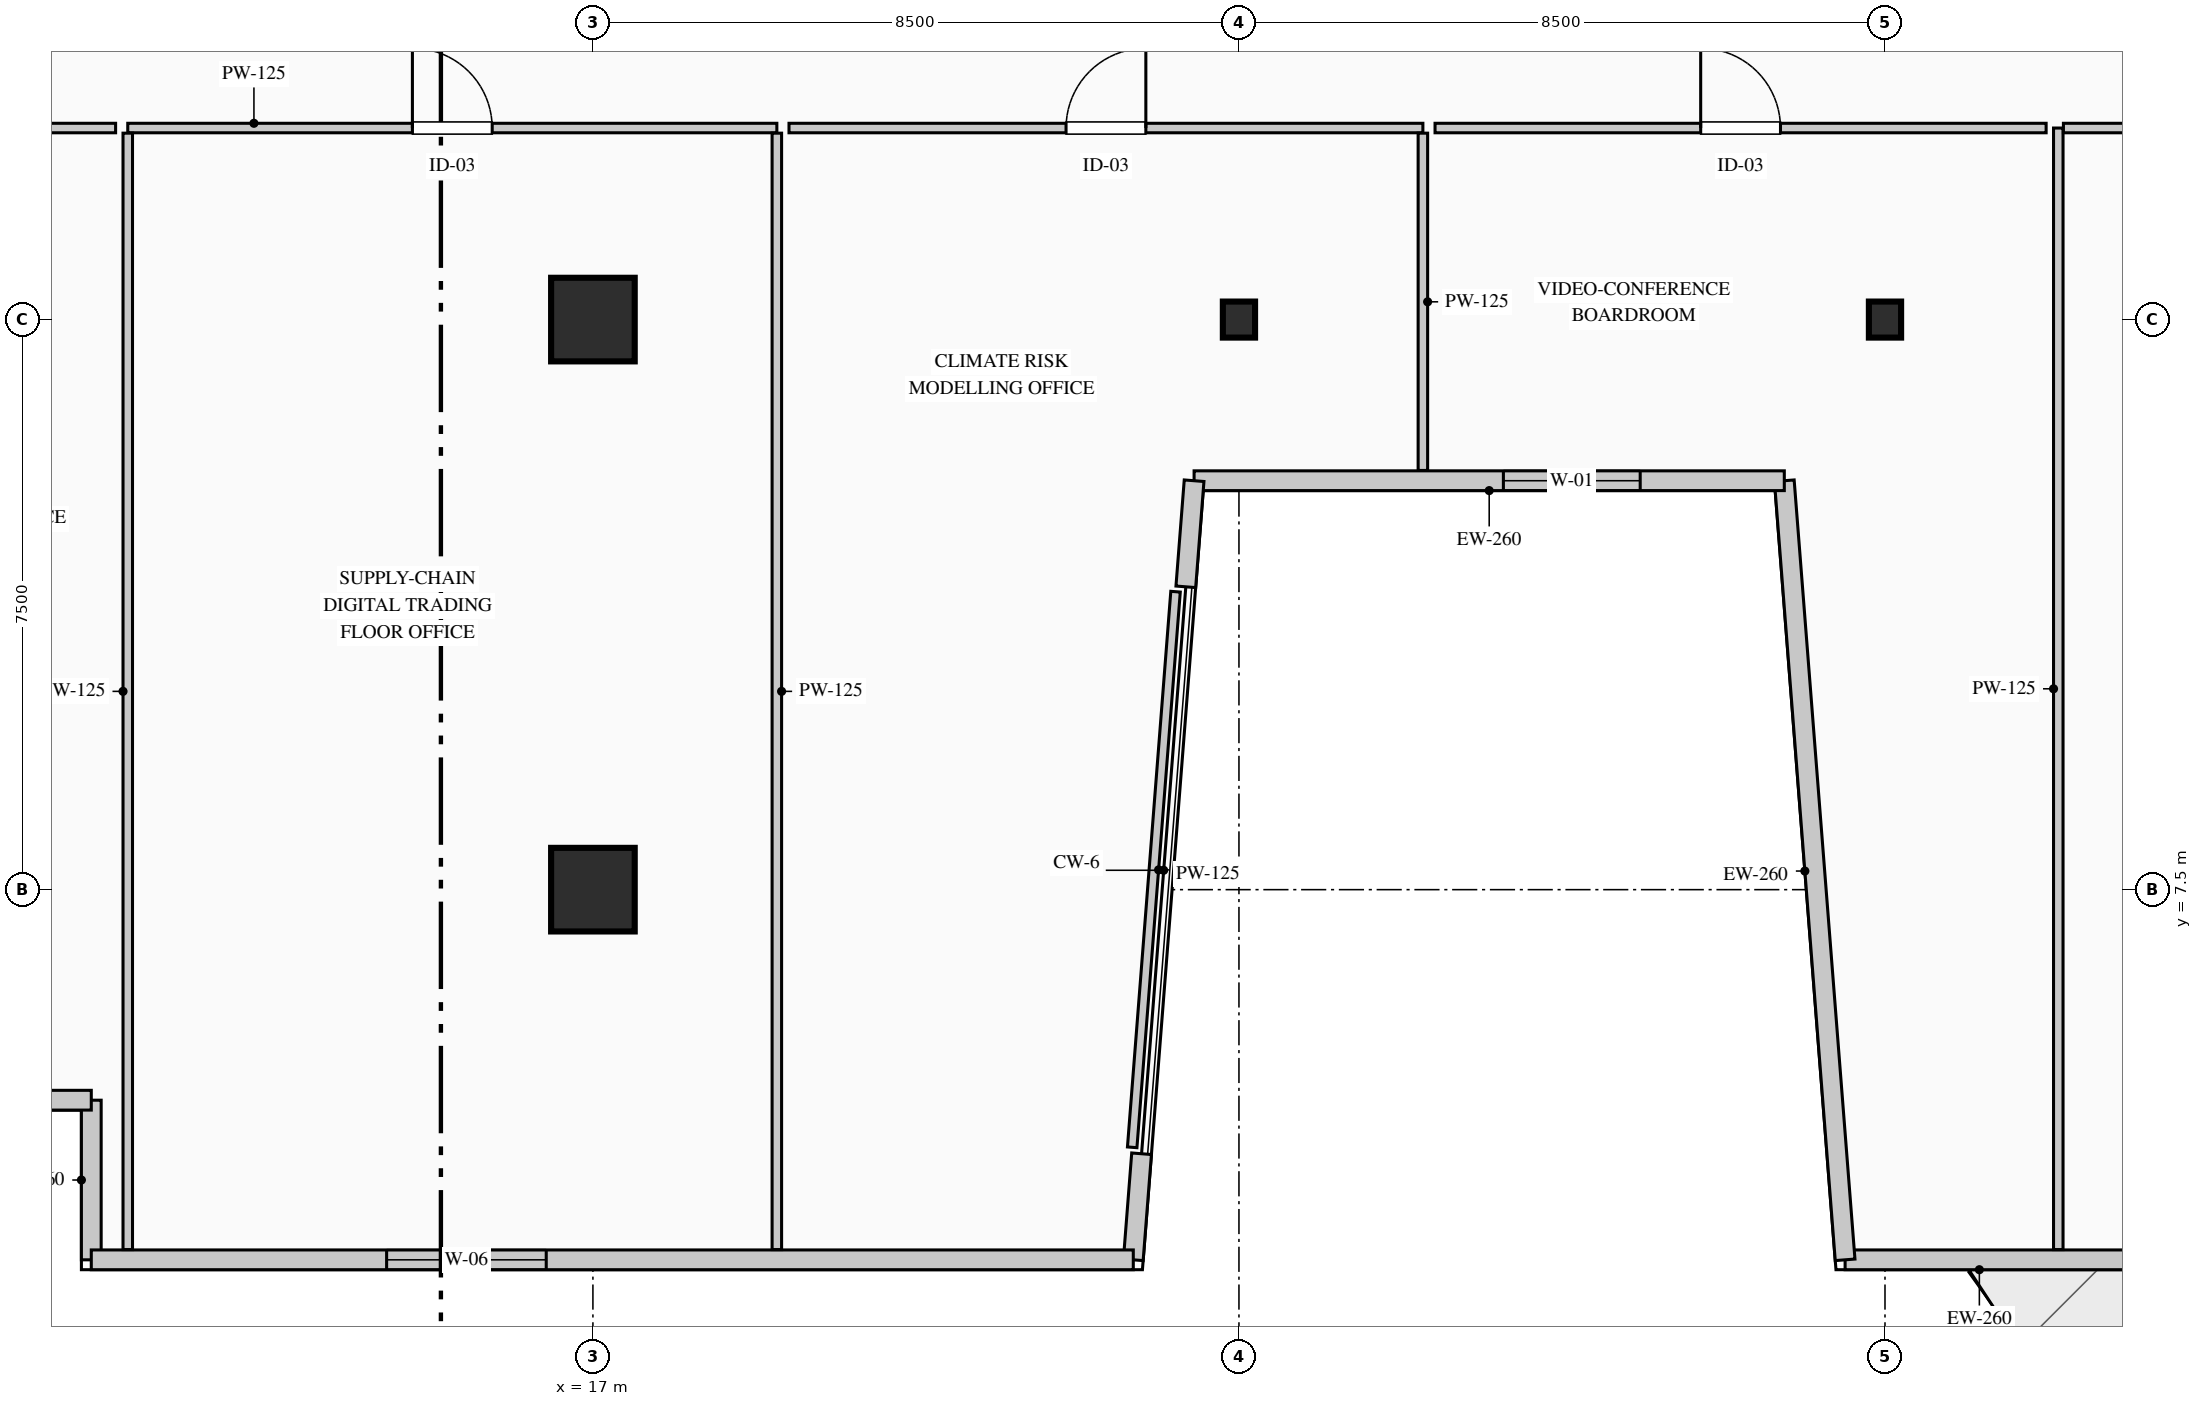
"""IFC4 building model, lengths in metres.
Left out: names, types, materials, properties, quantities, classifications, styles, units other than length and angle.
Written with IfcOpenShell. Run it as: python <this file> out.ifc"""

import sys

from ifc_helpers import new_model, si_unit, direction, frame, frame_2d, origin, origin_2d, place, context, subcontext, project, spatial, rectangle, i_section, extrude, element, fill, save


model = new_model("IFC4")
c1 = context("Model", 3, precision=1e-05, world=origin(), true_north=direction((0.0, 1.0)))
c2 = subcontext(c1, "Body", "Model", "MODEL_VIEW")
j1 = project(units=[si_unit("LENGTHUNIT", "METRE"), si_unit("PLANEANGLEUNIT", "RADIAN")], contexts=[c1])
p1 = place(None, origin())
s1 = spatial("IfcSite", under=j1, at=p1, CompositionType="ELEMENT")
p2 = place(p1, origin())
s2 = spatial("IfcBuilding", under=s1, at=p2, CompositionType="ELEMENT")
p3 = place(p2, frame((0.0, 0.0, 150.9)))
s3 = spatial("IfcBuildingStorey", under=s2, at=p3, CompositionType="ELEMENT", Elevation=150.9)
for number, where, z_axis, x_axis in (
    (1, (17.0, 7.5, 0.0), (0.0, 0.0, 1.0), (1.0, 0.0, 0.0)),
    (2, (17.0, 15.0, 0.0), (0.0, 0.0, 1.0), (1.0, 0.0, 0.0)),
):
    element("IfcColumn", number, at=place(p3, frame(where, z_axis=z_axis, x_axis=x_axis)), inside=s3, PredefinedType="COLUMN", context=c2, shape_type="SweptSolid", body=[
        extrude(rectangle(XDim=1.1, YDim=1.1, at=origin_2d()), origin(), (0.0, 0.0, 1.0), 3.95),
    ])
for number, where, z_axis, x_axis in (
    (3, (25.5, 15.0, 0.0), (0.0, 0.0, 1.0), (1.0, 0.0, 0.0)),
    (4, (34.0, 15.0, 0.0), (0.0, 0.0, 1.0), (1.0, 0.0, 0.0)),
):
    element("IfcColumn", number, at=place(p3, frame(where, z_axis=z_axis, x_axis=x_axis)), inside=s3, PredefinedType="COLUMN", context=c2, shape_type="SweptSolid", body=[
        extrude(i_section(OverallWidth=0.424, OverallDepth=0.474, WebThickness=0.048, FlangeThickness=0.077, FilletRadius=0.015, at=origin_2d()), origin(), (0.0, 0.0, 1.0), 3.95),
    ])
p4 = place(p3, frame((10.4, 2.63, 0.0), z_axis=(0.0, 0.0, 1.0), x_axis=(0.0, 1.0, 0.0)))
e5 = element("IfcWall", 5, at=p4, inside=s3, PredefinedType="STANDARD", context=c2, shape_type="SweptSolid", body=[
    extrude(rectangle(XDim=2.1, YDim=0.26, at=frame_2d((1.05, 0.0))), origin(), (0.0, 0.0, 1.0), 3.69),
])
p5 = place(p3, frame((10.4, 4.73, 0.0), z_axis=(0.0, 0.0, 1.0), x_axis=(-1.0, 0.0, 0.0)))
e6 = element("IfcWall", 6, at=p5, inside=s3, PredefinedType="STANDARD", context=c2, shape_type="SweptSolid", body=[
    extrude(rectangle(XDim=2.407, YDim=0.26, at=frame_2d((1.204, 0.0))), origin(), (0.0, 0.0, 1.0), 3.69),
])
p6 = place(p3, frame((42.44, 2.63, 0.0), z_axis=(0.0, 0.0, 1.0), x_axis=(-1.0, 0.0, 0.0)))
e7 = element("IfcWall", 7, at=p6, inside=s3, PredefinedType="STANDARD", context=c2, shape_type="SweptSolid", body=[
    extrude(rectangle(XDim=8.965, YDim=0.26, at=frame_2d((4.482, 0.0))), origin(), (0.0, 0.0, 1.0), 3.69),
])
p7 = place(p6, frame((3.882, 0.0, 0.0)))
e8 = element("IfcOpeningElement", 8, at=p7, cuts=e7, PredefinedType="OPENING", context=c2, shape_type="SweptSolid", body=[
    extrude(rectangle(XDim=1.2, YDim=2.2, at=frame_2d((0.6, 1.1))), frame((0.0, 0.14, 0.0), z_axis=(0.0, -1.0, 0.0), x_axis=(1.0, 0.0, 0.0)), (0.0, 0.0, 1.0), 0.28),
])
p8 = place(p3, frame((33.475, 2.63, 0.0), z_axis=(0.0, 0.0, 1.0), x_axis=(-0.077793257511, 0.996969512616, 0.0)))
e9 = element("IfcWall", 9, at=p8, inside=s3, PredefinedType="STANDARD", context=c2, shape_type="SweptSolid", body=[
    extrude(rectangle(XDim=10.281, YDim=0.26, at=frame_2d((5.141, 0.0))), origin(), (0.0, 0.0, 1.0), 3.69),
])
p9 = place(p3, frame((32.675, 12.88, 0.0), z_axis=(0.0, 0.0, 1.0), x_axis=(-1.0, 0.0, 0.0)))
e10 = element("IfcWall", 10, at=p9, inside=s3, PredefinedType="STANDARD", context=c2, shape_type="SweptSolid", body=[
    extrude(rectangle(XDim=7.765, YDim=0.26, at=frame_2d((3.883, 0.0))), origin(), (0.0, 0.0, 1.0), 3.69),
])
p10 = place(p9, frame((1.896, 0.0, 0.9)))
e11 = element("IfcOpeningElement", 11, at=p10, cuts=e10, PredefinedType="OPENING", context=c2, shape_type="SweptSolid", body=[
    extrude(rectangle(XDim=1.8, YDim=2.1, at=frame_2d((0.9, 1.05))), frame((0.0, 0.14, 0.0), z_axis=(0.0, -1.0, 0.0), x_axis=(1.0, 0.0, 0.0)), (0.0, 0.0, 1.0), 0.28),
])
for number, where, z_axis, x_axis in (
    (12, (24.91, 12.88, 0.0), (0.0, 0.0, 1.0), (-0.078, -0.997, 0.0)),
    (13, (24.219, 4.026, 0.0), (0.0, 0.0, 1.0), (-0.078, -0.997, 0.0)),
):
    element("IfcWall", number, at=place(p3, frame(where, z_axis=z_axis, x_axis=x_axis)), inside=s3, PredefinedType="STANDARD", context=c2, shape_type="SweptSolid", body=[
        extrude(rectangle(XDim=1.4, YDim=0.26, at=frame_2d((0.7, 0.0))), origin(), (0.0, 0.0, 1.0), 3.69),
    ])
p11 = place(p3, frame((24.11, 2.63, 0.0), z_axis=(0.0, 0.0, 1.0), x_axis=(-1.0, 0.0, 0.0)))
e14 = element("IfcWall", 14, at=p11, inside=s3, PredefinedType="STANDARD", context=c2, shape_type="SweptSolid", body=[
    extrude(rectangle(XDim=13.71, YDim=0.26, at=frame_2d((6.855, 0.0))), origin(), (0.0, 0.0, 1.0), 3.69),
])
p12 = place(p11, frame((7.724, 0.0, 0.9)))
e15 = element("IfcOpeningElement", 15, at=p12, cuts=e14, PredefinedType="OPENING", context=c2, shape_type="SweptSolid", body=[
    extrude(rectangle(XDim=2.1, YDim=2.0, at=frame_2d((1.05, 1.0))), frame((0.0, 0.14, 0.0), z_axis=(0.0, -1.0, 0.0), x_axis=(1.0, 0.0, 0.0)), (0.0, 0.0, 1.0), 0.28),
])
p13 = place(p3, frame((10.88, 17.52, 0.0), z_axis=(0.0, 0.0, 1.0), x_axis=(1.0, 0.0, 0.0)))
e16 = element("IfcWall", 16, at=p13, inside=s3, PredefinedType="PARTITIONING", context=c2, shape_type="SweptSolid", body=[
    extrude(rectangle(XDim=8.54, YDim=0.125, at=frame_2d((4.27, 0.0))), origin(), (0.0, 0.0, 1.0), 3.69),
])
p14 = place(p13, frame((3.745, 0.0, 0.0)))
e17 = element("IfcOpeningElement", 17, at=p14, cuts=e16, PredefinedType="OPENING", context=c2, shape_type="SweptSolid", body=[
    extrude(rectangle(XDim=1.05, YDim=2.15, at=frame_2d((0.525, 1.075))), frame((0.0, 0.073, 0.0), z_axis=(0.0, -1.0, 0.0), x_axis=(1.0, 0.0, 0.0)), (0.0, 0.0, 1.0), 0.145),
])
for number, where, z_axis, x_axis in (
    (18, (19.42, 17.452, 0.0), (0.0, 0.0, 1.0), (0.0, -1.0, 0.0)),
    (19, (10.88, 2.765, 0.0), (0.0, 0.0, 1.0), (0.0, 1.0, 0.0)),
):
    element("IfcWall", number, at=place(p3, frame(where, z_axis=z_axis, x_axis=x_axis)), inside=s3, PredefinedType="PARTITIONING", context=c2, shape_type="SweptSolid", body=[
        extrude(rectangle(XDim=14.688, YDim=0.125, at=frame_2d((7.344, 0.0))), origin(), (0.0, 0.0, 1.0), 3.69),
    ])
p15 = place(p3, frame((24.666, 11.42, 0.0), z_axis=(0.0, 0.0, 1.0), x_axis=(-0.077816821526, -0.996967673642, 0.0)))
e20 = element("IfcWall", 20, at=p15, inside=s3, PredefinedType="PARTITIONING", context=c2, shape_type="SweptSolid", body=[
    extrude(rectangle(XDim=7.332, YDim=0.125, at=frame_2d((3.666, 0.0))), origin(), (0.0, 0.0, 1.0), 3.69),
])
p16 = place(p3, frame((19.58, 17.52, 0.0), z_axis=(0.0, 0.0, 1.0), x_axis=(1.0, 0.0, 0.0)))
e21 = element("IfcWall", 21, at=p16, inside=s3, PredefinedType="PARTITIONING", context=c2, shape_type="SweptSolid", body=[
    extrude(rectangle(XDim=8.34, YDim=0.125, at=frame_2d((4.17, 0.0))), origin(), (0.0, 0.0, 1.0), 3.475),
])
p17 = place(p16, frame((3.645, 0.0, 0.0)))
e22 = element("IfcOpeningElement", 22, at=p17, cuts=e21, PredefinedType="OPENING", context=c2, shape_type="SweptSolid", body=[
    extrude(rectangle(XDim=1.05, YDim=2.15, at=frame_2d((0.525, 1.075))), frame((0.0, 0.073, 0.0), z_axis=(0.0, -1.0, 0.0), x_axis=(1.0, 0.0, 0.0)), (0.0, 0.0, 1.0), 0.145),
])
p18 = place(p3, frame((27.92, 17.452, 0.0), z_axis=(0.0, 0.0, 1.0), x_axis=(0.0, -1.0, 0.0)))
e23 = element("IfcWall", 23, at=p18, inside=s3, PredefinedType="PARTITIONING", context=c2, shape_type="SweptSolid", body=[
    extrude(rectangle(XDim=4.438, YDim=0.125, at=frame_2d((2.219, 0.0))), origin(), (0.0, 0.0, 1.0), 3.69),
])
p19 = place(p3, frame((36.28, 2.765, 0.0), z_axis=(0.0, 0.0, 1.0), x_axis=(0.0, 1.0, 0.0)))
e24 = element("IfcWall", 24, at=p19, inside=s3, PredefinedType="PARTITIONING", context=c2, shape_type="SweptSolid", body=[
    extrude(rectangle(XDim=14.755, YDim=0.125, at=frame_2d((7.377, 0.0))), origin(), (0.0, 0.0, 1.0), 3.69),
])
p20 = place(p3, frame((36.347, 17.52, 0.0), z_axis=(0.0, 0.0, 1.0), x_axis=(1.0, 0.0, 0.0)))
e25 = element("IfcWall", 25, at=p20, inside=s3, PredefinedType="PARTITIONING", context=c2, shape_type="SweptSolid", body=[
    extrude(rectangle(XDim=8.603, YDim=0.125, at=frame_2d((4.301, 0.0))), origin(), (0.0, 0.0, 1.0), 3.69),
])
p21 = place(p20, frame((3.776, 0.0, 0.0)))
e26 = element("IfcOpeningElement", 26, at=p21, cuts=e25, PredefinedType="OPENING", context=c2, shape_type="SweptSolid", body=[
    extrude(rectangle(XDim=1.05, YDim=2.15, at=frame_2d((0.525, 1.075))), frame((0.0, 0.073, 0.0), z_axis=(0.0, -1.0, 0.0), x_axis=(1.0, 0.0, 0.0)), (0.0, 0.0, 1.0), 0.145),
])
p22 = place(p3, frame((6.36, 17.52, 0.0), z_axis=(0.0, 0.0, 1.0), x_axis=(1.0, 0.0, 0.0)))
e27 = element("IfcWall", 27, at=p22, inside=s3, PredefinedType="PARTITIONING", context=c2, shape_type="SweptSolid", body=[
    extrude(rectangle(XDim=4.36, YDim=0.125, at=frame_2d((2.18, 0.0))), origin(), (0.0, 0.0, 1.0), 3.69),
])
p23 = place(p22, frame((1.655, 0.0, 0.0)))
e28 = element("IfcOpeningElement", 28, at=p23, cuts=e27, PredefinedType="OPENING", context=c2, shape_type="SweptSolid", body=[
    extrude(rectangle(XDim=1.05, YDim=2.15, at=frame_2d((0.525, 1.075))), frame((0.0, 0.073, 0.0), z_axis=(0.0, -1.0, 0.0), x_axis=(1.0, 0.0, 0.0)), (0.0, 0.0, 1.0), 0.145),
])
p24 = place(p3, frame((28.08, 17.52, 0.0), z_axis=(0.0, 0.0, 1.0), x_axis=(1.0, 0.0, 0.0)))
e29 = element("IfcWall", 29, at=p24, inside=s3, PredefinedType="PARTITIONING", context=c2, shape_type="SweptSolid", body=[
    extrude(rectangle(XDim=8.04, YDim=0.125, at=frame_2d((4.02, 0.0))), origin(), (0.0, 0.0, 1.0), 3.475),
])
p25 = place(p24, frame((3.495, 0.0, 0.0)))
e30 = element("IfcOpeningElement", 30, at=p25, cuts=e29, PredefinedType="OPENING", context=c2, shape_type="SweptSolid", body=[
    extrude(rectangle(XDim=1.05, YDim=2.15, at=frame_2d((0.525, 1.075))), frame((0.0, 0.073, 0.0), z_axis=(0.0, -1.0, 0.0), x_axis=(1.0, 0.0, 0.0)), (0.0, 0.0, 1.0), 0.145),
])
p26 = place(p10, origin())
e31 = element("IfcWindow", 31, at=p26, inside=s3, PartitioningType="SINGLE_PANEL", PredefinedType="WINDOW", context=c2, shape_type="SweptSolid", body=[
    extrude(rectangle(XDim=1.8, YDim=2.1, at=frame_2d((0.9, 1.05))), frame((0.0, 0.03, 0.0), z_axis=(0.0, -1.0, 0.0), x_axis=(1.0, 0.0, 0.0)), (0.0, 0.0, 1.0), 0.06),
])
fill(e11, e31)
p27 = place(p12, origin())
e32 = element("IfcWindow", 32, at=p27, inside=s3, PartitioningType="DOUBLE_PANEL_VERTICAL", PredefinedType="WINDOW", context=c2, shape_type="SweptSolid", body=[
    extrude(rectangle(XDim=2.1, YDim=2.0, at=frame_2d((1.05, 1.0))), frame((0.0, 0.03, 0.0), z_axis=(0.0, -1.0, 0.0), x_axis=(1.0, 0.0, 0.0)), (0.0, 0.0, 1.0), 0.06),
])
fill(e15, e32)
p28 = place(p14, origin())
e33 = element("IfcDoor", 33, at=p28, inside=s3, OperationType="SINGLE_SWING_LEFT", PredefinedType="DOOR", context=c2, shape_type="SweptSolid", body=[
    extrude(rectangle(XDim=1.05, YDim=2.15, at=frame_2d((0.525, 1.075))), frame((0.0, 0.025, 0.0), z_axis=(0.0, -1.0, 0.0), x_axis=(1.0, 0.0, 0.0)), (0.0, 0.0, 1.0), 0.05),
])
fill(e17, e33)
p29 = place(p17, origin())
e34 = element("IfcDoor", 34, at=p29, inside=s3, OperationType="SINGLE_SWING_RIGHT", PredefinedType="DOOR", context=c2, shape_type="SweptSolid", body=[
    extrude(rectangle(XDim=1.05, YDim=2.15, at=frame_2d((0.525, 1.075))), frame((0.0, 0.025, 0.0), z_axis=(0.0, -1.0, 0.0), x_axis=(1.0, 0.0, 0.0)), (0.0, 0.0, 1.0), 0.05),
])
fill(e22, e34)
p30 = place(p25, origin())
e35 = element("IfcDoor", 35, at=p30, inside=s3, OperationType="SINGLE_SWING_LEFT", PredefinedType="DOOR", context=c2, shape_type="SweptSolid", body=[
    extrude(rectangle(XDim=1.05, YDim=2.15, at=frame_2d((0.525, 1.075))), frame((0.0, 0.025, 0.0), z_axis=(0.0, -1.0, 0.0), x_axis=(1.0, 0.0, 0.0)), (0.0, 0.0, 1.0), 0.05),
])
fill(e30, e35)
save(model, sys.argv[1])
